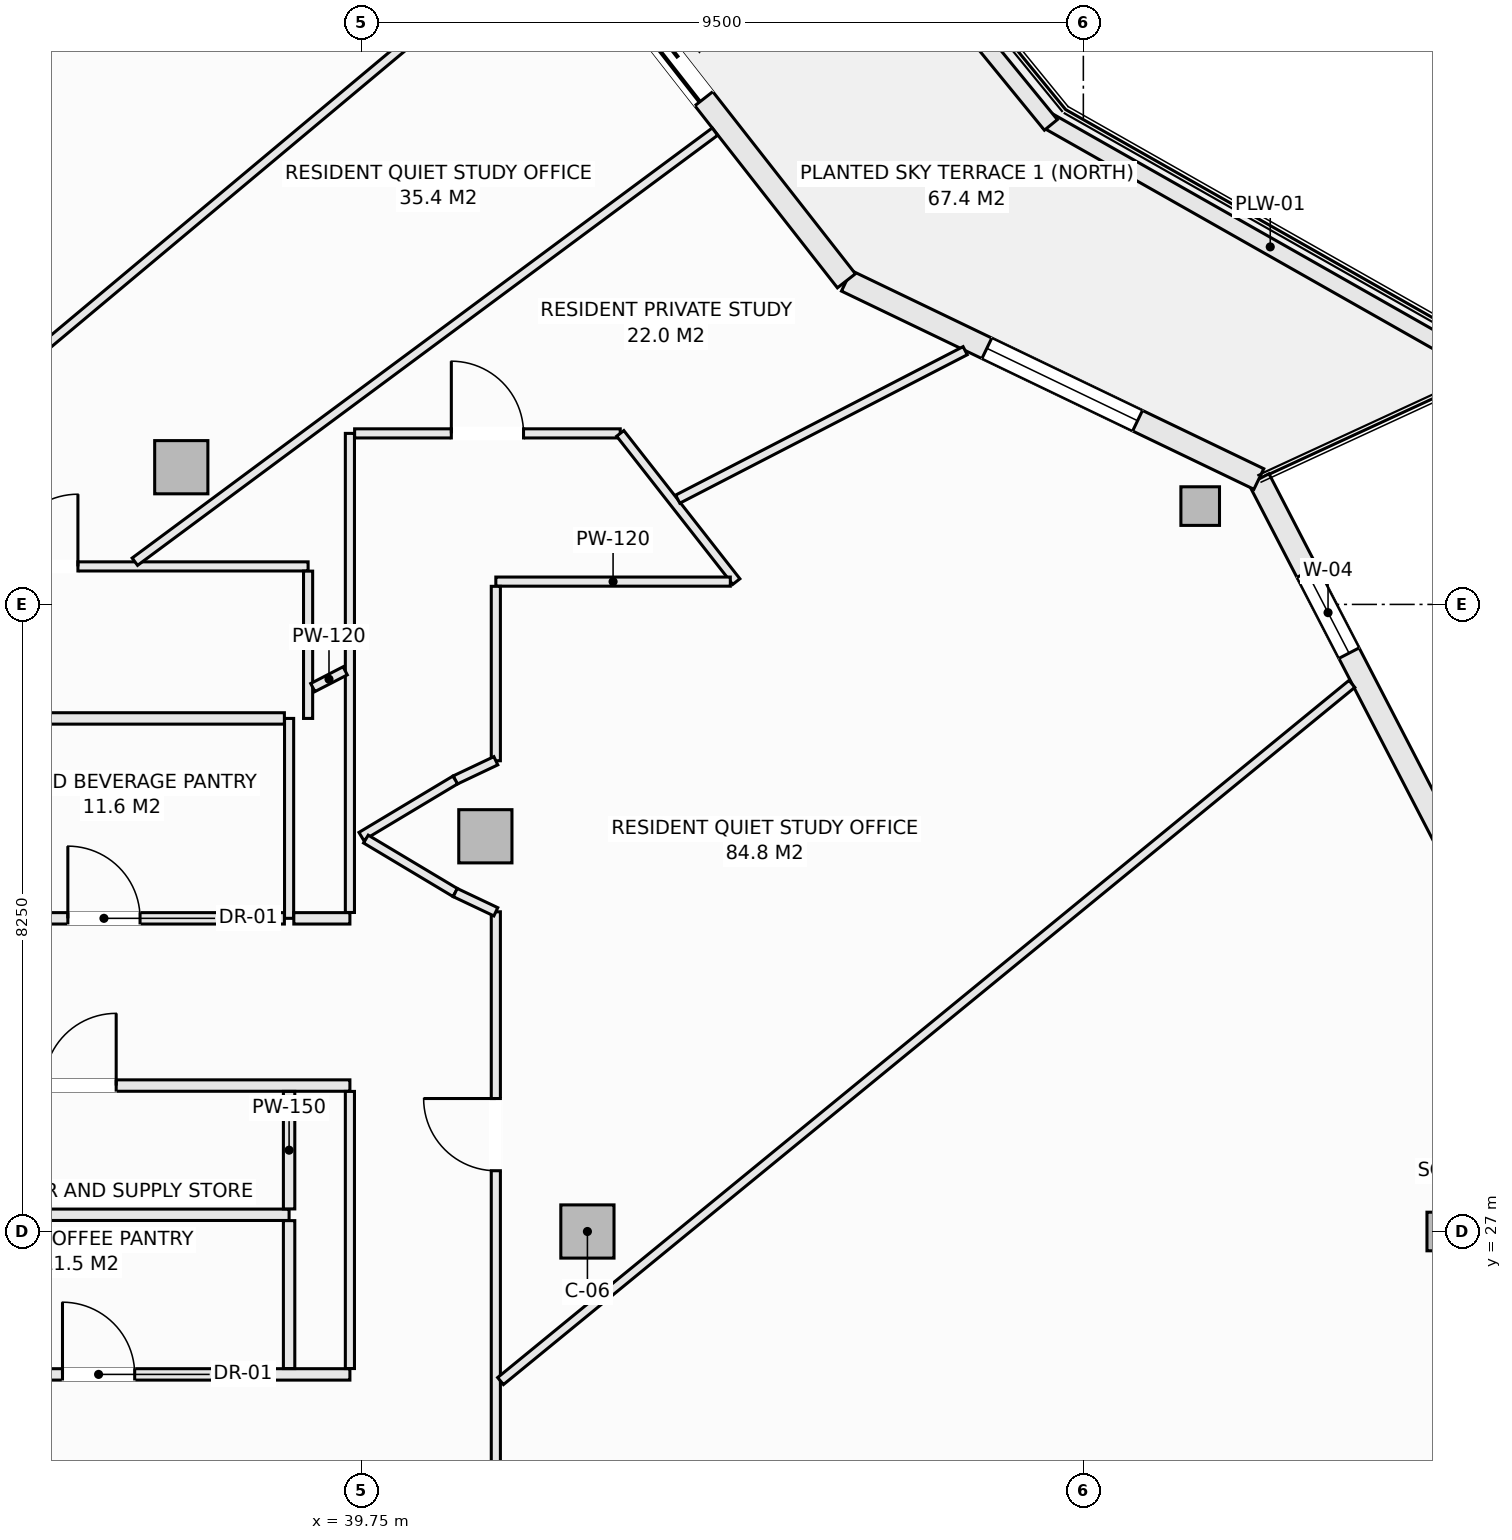
"""IFC4 building model, lengths in metres.
Left out: names, types, materials, properties, quantities, classifications, styles, units other than length and angle.
Written with IfcOpenShell. Run it as: python <this file> out.ifc"""

import sys

from ifc_helpers import new_model, si_unit, direction, frame, frame_2d, origin, origin_2d, place, context, subcontext, project, spatial, rectangle, hollow_rectangle, extrude, element, fill, save


model = new_model("IFC4")
c1 = context("Model", 3, precision=1e-05, world=origin(), true_north=direction((0.0, 1.0)))
c2 = subcontext(c1, "Body", "Model", "MODEL_VIEW")
j1 = project(units=[si_unit("LENGTHUNIT", "METRE"), si_unit("PLANEANGLEUNIT", "RADIAN")], contexts=[c1])
p1 = place(None, origin())
s1 = spatial("IfcSite", under=j1, at=p1, CompositionType="ELEMENT")
p2 = place(p1, origin())
s2 = spatial("IfcBuilding", under=s1, at=p2, CompositionType="ELEMENT")
p3 = place(p2, frame((0.0, 0.0, 216.2)))
s3 = spatial("IfcBuildingStorey", under=s2, at=p3, CompositionType="ELEMENT", Elevation=216.2)
for number, where, z_axis, x_axis in (
    (1, (54.025, 27.0, -0.27), (0.0, 0.0, 1.0), (1.0, 0.0, 0.0)),
    (2, (50.787, 36.544, -0.27), (0.0, 0.0, 1.0), (1.0, 0.0, 0.0)),
):
    element("IfcColumn", number, at=place(p3, frame(where, z_axis=z_axis, x_axis=x_axis)), inside=s3, PredefinedType="COLUMN", context=c2, shape_type="SweptSolid", body=[
        extrude(hollow_rectangle(XDim=0.508, YDim=0.508, WallThickness=0.019, at=origin_2d()), origin(), (0.0, 0.0, 1.0), 3.3),
    ])
for number, where, z_axis, x_axis in (
    (3, (42.725, 27.0, -0.27), (0.0, 0.0, 1.0), (1.0, 0.0, 0.0)),
    (4, (41.382, 32.199, -0.27), (0.0, 0.0, 1.0), (1.0, 0.0, 0.0)),
    (5, (37.382, 37.055, -0.27), (0.0, 0.0, 1.0), (1.0, 0.0, 0.0)),
):
    element("IfcColumn", number, at=place(p3, frame(where, z_axis=z_axis, x_axis=x_axis)), inside=s3, PredefinedType="COLUMN", context=c2, shape_type="SweptSolid", body=[
        extrude(rectangle(XDim=0.7, YDim=0.7, at=origin_2d()), origin(), (0.0, 0.0, 1.0), 3.3),
    ])
p4 = place(p3, frame((51.559, 36.9, 0.0), z_axis=(0.0, 0.0, 1.0), x_axis=(0.459808219482, -0.888018243786, 0.0)))
e6 = element("IfcWall", 6, at=p4, inside=s3, PredefinedType="SOLIDWALL", context=c2, shape_type="SweptSolid", body=[
    extrude(rectangle(XDim=5.378, YDim=0.3, at=frame_2d((2.689, 0.0))), origin(), (0.0, 0.0, 1.0), 2.605),
])
p5 = place(p4, frame((1.38, 0.0, 0.72)))
e7 = element("IfcOpeningElement", 7, at=p5, cuts=e6, PredefinedType="OPENING", context=c2, shape_type="SweptSolid", body=[
    extrude(rectangle(XDim=1.2, YDim=1.65, at=frame_2d((0.6, 0.825))), frame((0.0, 0.16, 0.0), z_axis=(0.0, -1.0, 0.0), x_axis=(1.0, 0.0, 0.0)), (0.0, 0.0, 1.0), 0.32),
])
p6 = place(p3, frame((46.133, 39.507, 0.0), z_axis=(0.0, 0.0, 1.0), x_axis=(0.901348331142, -0.433094892545, 0.0)))
e8 = element("IfcWall", 8, at=p6, inside=s3, PredefinedType="SOLIDWALL", context=c2, shape_type="SweptSolid", body=[
    extrude(rectangle(XDim=6.021, YDim=0.3, at=frame_2d((3.01, 0.0))), origin(), (0.0, 0.0, 1.0), 2.605),
])
p7 = place(p6, frame((2.05, 0.0, 0.72)))
e9 = element("IfcOpeningElement", 9, at=p7, cuts=e8, PredefinedType="OPENING", context=c2, shape_type="SweptSolid", body=[
    extrude(rectangle(XDim=2.2, YDim=1.65, at=frame_2d((1.1, 0.825))), frame((0.0, 0.16, 0.0), z_axis=(0.0, -1.0, 0.0), x_axis=(1.0, 0.0, 0.0)), (0.0, 0.0, 1.0), 0.32),
])
p8 = place(p3, frame((42.5, 44.147, 0.0), z_axis=(0.0, 0.0, 1.0), x_axis=(0.616450126935, -0.787393955401, 0.0)))
e10 = element("IfcWall", 10, at=p8, inside=s3, PredefinedType="SOLIDWALL", context=c2, shape_type="SweptSolid", body=[
    extrude(rectangle(XDim=5.893, YDim=0.3, at=frame_2d((2.946, 0.0))), origin(), (0.0, 0.0, 1.0), 2.605),
])
p9 = place(p8, frame((1.05, 0.0, 0.0)))
e11 = element("IfcOpeningElement", 11, at=p9, cuts=e10, PredefinedType="OPENING", context=c2, shape_type="SweptSolid", body=[
    extrude(rectangle(XDim=1.8, YDim=2.25, at=frame_2d((0.9, 1.125))), frame((0.0, 0.16, 0.0), z_axis=(0.0, -1.0, 0.0), x_axis=(1.0, 0.0, 0.0)), (0.0, 0.0, 1.0), 0.32),
])
p10 = place(p3, frame((48.776, 41.617, 0.0), z_axis=(0.0, 0.0, 1.0), x_axis=(0.869860619267, -0.493297580623, 0.0)))
e12 = element("IfcWall", 12, at=p10, inside=s3, PredefinedType="PARAPET", context=c2, shape_type="SweptSolid", body=[
    extrude(rectangle(XDim=6.743, YDim=0.22, at=frame_2d((3.371, 0.0))), origin(), (0.0, 0.0, 1.0), 0.52),
])
p11 = place(p3, frame((44.448, 46.913, 0.0), z_axis=(0.0, 0.0, 1.0), x_axis=(0.632697312147, -0.774399193699, 0.0)))
e13 = element("IfcWall", 13, at=p11, inside=s3, PredefinedType="PARAPET", context=c2, shape_type="SweptSolid", body=[
    extrude(rectangle(XDim=6.914, YDim=0.22, at=frame_2d((3.457, 0.0))), origin(), (0.0, 0.0, 1.0), 0.52),
])
p12 = place(p3, frame((30.077, 28.92, 0.0), z_axis=(0.0, 0.0, 1.0), x_axis=(1.0, 0.0, 0.0)))
e14 = element("IfcWall", 14, at=p12, inside=s3, PredefinedType="PARTITIONING", context=c2, shape_type="SweptSolid", body=[
    extrude(rectangle(XDim=9.523, YDim=0.15, at=frame_2d((4.762, 0.0))), origin(), (0.0, 0.0, 1.0), 3.03),
])
p13 = place(p12, frame((1.342, 0.0, 0.0)))
e15 = element("IfcOpeningElement", 15, at=p13, cuts=e14, PredefinedType="OPENING", context=c2, shape_type="SweptSolid", body=[
    extrude(rectangle(XDim=0.95, YDim=2.1, at=frame_2d((0.475, 1.05))), frame((0.0, 0.085, 0.0), z_axis=(0.0, -1.0, 0.0), x_axis=(1.0, 0.0, 0.0)), (0.0, 0.0, 1.0), 0.17),
])
p14 = place(p12, frame((5.498, 0.0, 0.0)))
e16 = element("IfcOpeningElement", 16, at=p14, cuts=e14, PredefinedType="OPENING", context=c2, shape_type="SweptSolid", body=[
    extrude(rectangle(XDim=0.95, YDim=2.1, at=frame_2d((0.475, 1.05))), frame((0.0, 0.085, 0.0), z_axis=(0.0, -1.0, 0.0), x_axis=(1.0, 0.0, 0.0)), (0.0, 0.0, 1.0), 0.17),
])
p15 = place(p3, frame((33.377, 25.12, 0.0), z_axis=(0.0, 0.0, 1.0), x_axis=(1.0, 0.0, 0.0)))
e17 = element("IfcWall", 17, at=p15, inside=s3, PredefinedType="PARTITIONING", context=c2, shape_type="SweptSolid", body=[
    extrude(rectangle(XDim=6.223, YDim=0.15, at=frame_2d((3.112, 0.0))), origin(), (0.0, 0.0, 1.0), 3.03),
])
p16 = place(p15, frame((2.441, 0.0, 0.0)))
e18 = element("IfcOpeningElement", 18, at=p16, cuts=e17, PredefinedType="OPENING", context=c2, shape_type="SweptSolid", body=[
    extrude(rectangle(XDim=0.95, YDim=2.1, at=frame_2d((0.475, 1.05))), frame((0.0, 0.085, 0.0), z_axis=(0.0, -1.0, 0.0), x_axis=(1.0, 0.0, 0.0)), (0.0, 0.0, 1.0), 0.17),
])
p17 = place(p3, frame((33.377, 27.22, 0.0), z_axis=(0.0, 0.0, 1.0), x_axis=(1.0, 0.0, 0.0)))
e19 = element("IfcWall", 19, at=p17, inside=s3, PredefinedType="PARTITIONING", context=c2, shape_type="SweptSolid", body=[
    extrude(rectangle(XDim=5.423, YDim=0.15, at=frame_2d((2.711, 0.0))), origin(), (0.0, 0.0, 1.0), 3.03),
])
p18 = place(p3, frame((38.8, 25.197, 0.0), z_axis=(0.0, 0.0, 1.0), x_axis=(0.0, 1.0, 0.0)))
e20 = element("IfcWall", 20, at=p18, inside=s3, PredefinedType="PARTITIONING", context=c2, shape_type="SweptSolid", body=[
    extrude(rectangle(XDim=1.946, YDim=0.15, at=frame_2d((0.973, 0.0))), origin(), (0.0, 0.0, 1.0), 3.03),
])
p19 = place(p3, frame((38.8, 27.297, 0.0), z_axis=(0.0, 0.0, 1.0), x_axis=(0.0, 1.0, 0.0)))
e21 = element("IfcWall", 21, at=p19, inside=s3, PredefinedType="PARTITIONING", context=c2, shape_type="SweptSolid", body=[
    extrude(rectangle(XDim=1.546, YDim=0.15, at=frame_2d((0.773, 0.0))), origin(), (0.0, 0.0, 1.0), 3.03),
])
p20 = place(p3, frame((38.8, 31.12, 0.0), z_axis=(0.0, 0.0, 1.0), x_axis=(0.0, 1.0, 0.0)))
e22 = element("IfcWall", 22, at=p20, inside=s3, PredefinedType="PARTITIONING", context=c2, shape_type="SweptSolid", body=[
    extrude(rectangle(XDim=2.63, YDim=0.12, at=frame_2d((1.315, 0.0))), origin(), (0.0, 0.0, 1.0), 3.03),
])
p21 = place(p3, frame((30.077, 31.12, 0.0), z_axis=(0.0, 0.0, 1.0), x_axis=(1.0, 0.0, 0.0)))
e23 = element("IfcWall", 23, at=p21, inside=s3, PredefinedType="PARTITIONING", context=c2, shape_type="SweptSolid", body=[
    extrude(rectangle(XDim=8.661, YDim=0.15, at=frame_2d((4.331, 0.0))), origin(), (0.0, 0.0, 1.0), 3.03),
])
p22 = place(p21, frame((1.892, 0.0, 0.0)))
e24 = element("IfcOpeningElement", 24, at=p22, cuts=e23, PredefinedType="OPENING", context=c2, shape_type="SweptSolid", body=[
    extrude(rectangle(XDim=0.95, YDim=2.1, at=frame_2d((0.475, 1.05))), frame((0.0, 0.085, 0.0), z_axis=(0.0, -1.0, 0.0), x_axis=(1.0, 0.0, 0.0)), (0.0, 0.0, 1.0), 0.17),
])
p23 = place(p21, frame((5.812, 0.0, 0.0)))
e25 = element("IfcOpeningElement", 25, at=p23, cuts=e23, PredefinedType="OPENING", context=c2, shape_type="SweptSolid", body=[
    extrude(rectangle(XDim=0.95, YDim=2.1, at=frame_2d((0.475, 1.05))), frame((0.0, 0.085, 0.0), z_axis=(0.0, -1.0, 0.0), x_axis=(1.0, 0.0, 0.0)), (0.0, 0.0, 1.0), 0.17),
])
p24 = place(p3, frame((38.862, 31.12, 0.0), z_axis=(0.0, 0.0, 1.0), x_axis=(1.0, 0.0, 0.0)))
e26 = element("IfcWall", 26, at=p24, inside=s3, PredefinedType="PARTITIONING", context=c2, shape_type="SweptSolid", body=[
    extrude(rectangle(XDim=0.738, YDim=0.15, at=frame_2d((0.369, 0.0))), origin(), (0.0, 0.0, 1.0), 3.03),
])
p25 = place(p3, frame((30.077, 33.75, 0.0), z_axis=(0.0, 0.0, 1.0), x_axis=(1.0, 0.0, 0.0)))
e27 = element("IfcWall", 27, at=p25, inside=s3, PredefinedType="PARTITIONING", context=c2, shape_type="SweptSolid", body=[
    extrude(rectangle(XDim=8.661, YDim=0.15, at=frame_2d((4.331, 0.0))), origin(), (0.0, 0.0, 1.0), 3.03),
])
p26 = place(p3, frame((33.833, 35.75, 0.0), z_axis=(0.0, 0.0, 1.0), x_axis=(1.0, 0.0, 0.0)))
e28 = element("IfcWall", 28, at=p26, inside=s3, PredefinedType="PARTITIONING", context=c2, shape_type="SweptSolid", body=[
    extrude(rectangle(XDim=5.217, YDim=0.12, at=frame_2d((2.608, 0.0))), origin(), (0.0, 0.0, 1.0), 2.478),
])
p27 = place(p26, frame((1.239, 0.0, 0.0)))
e29 = element("IfcOpeningElement", 29, at=p27, cuts=e28, PredefinedType="OPENING", context=c2, shape_type="SweptSolid", body=[
    extrude(rectangle(XDim=0.95, YDim=2.1, at=frame_2d((0.475, 1.05))), frame((0.0, 0.07, 0.0), z_axis=(0.0, -1.0, 0.0), x_axis=(1.0, 0.0, 0.0)), (0.0, 0.0, 1.0), 0.14),
])
p28 = place(p3, frame((39.05, 33.75, 0.0), z_axis=(0.0, 0.0, 1.0), x_axis=(0.0, 1.0, 0.0)))
e30 = element("IfcWall", 30, at=p28, inside=s3, PredefinedType="PARTITIONING", context=c2, shape_type="SweptSolid", body=[
    extrude(rectangle(XDim=1.938, YDim=0.12, at=frame_2d((0.969, 0.0))), origin(), (0.0, 0.0, 1.0), 3.03),
])
p29 = place(p3, frame((39.6, 25.197, 0.0), z_axis=(0.0, 0.0, 1.0), x_axis=(0.0, 1.0, 0.0)))
e31 = element("IfcWall", 31, at=p29, inside=s3, PredefinedType="PARTITIONING", context=c2, shape_type="SweptSolid", body=[
    extrude(rectangle(XDim=3.646, YDim=0.12, at=frame_2d((1.823, 0.0))), origin(), (0.0, 0.0, 1.0), 3.03),
])
p30 = place(p3, frame((39.6, 31.197, 0.0), z_axis=(0.0, 0.0, 1.0), x_axis=(0.0, 1.0, 0.0)))
e32 = element("IfcWall", 32, at=p30, inside=s3, PredefinedType="PARTITIONING", context=c2, shape_type="SweptSolid", body=[
    extrude(rectangle(XDim=6.303, YDim=0.12, at=frame_2d((3.151, 0.0))), origin(), (0.0, 0.0, 1.0), 3.03),
])
p31 = place(p3, frame((39.662, 37.5, 0.0), z_axis=(0.0, 0.0, 1.0), x_axis=(1.0, 0.0, 0.0)))
e33 = element("IfcWall", 33, at=p31, inside=s3, PredefinedType="PARTITIONING", context=c2, shape_type="SweptSolid", body=[
    extrude(rectangle(XDim=3.495, YDim=0.12, at=frame_2d((1.748, 0.0))), origin(), (0.0, 0.0, 1.0), 2.77),
])
p32 = place(p31, frame((1.272, 0.0, 0.0)))
e34 = element("IfcOpeningElement", 34, at=p32, cuts=e33, PredefinedType="OPENING", context=c2, shape_type="SweptSolid", body=[
    extrude(rectangle(XDim=0.95, YDim=2.1, at=frame_2d((0.475, 1.05))), frame((0.0, 0.07, 0.0), z_axis=(0.0, -1.0, 0.0), x_axis=(1.0, 0.0, 0.0)), (0.0, 0.0, 1.0), 0.14),
])
p33 = place(p3, frame((43.157, 37.5, 0.0), z_axis=(0.0, 0.0, 1.0), x_axis=(0.616571357052, -0.78729902938, 0.0)))
e35 = element("IfcWall", 35, at=p33, inside=s3, PredefinedType="PARTITIONING", context=c2, shape_type="SweptSolid", body=[
    extrude(rectangle(XDim=2.477, YDim=0.12, at=frame_2d((1.238, 0.0))), origin(), (0.0, 0.0, 1.0), 3.03),
])
p34 = place(p3, frame((41.52, 35.55, 0.0), z_axis=(0.0, 0.0, 1.0), x_axis=(1.0, 0.0, 0.0)))
e36 = element("IfcWall", 36, at=p34, inside=s3, PredefinedType="PARTITIONING", context=c2, shape_type="SweptSolid", body=[
    extrude(rectangle(XDim=3.085, YDim=0.12, at=frame_2d((1.542, 0.0))), origin(), (0.0, 0.0, 1.0), 3.03),
])
p35 = place(p3, frame((41.52, 22.794, 0.0), z_axis=(0.0, 0.0, 1.0), x_axis=(0.0, 1.0, 0.0)))
e37 = element("IfcWall", 37, at=p35, inside=s3, PredefinedType="PARTITIONING", context=c2, shape_type="SweptSolid", body=[
    extrude(rectangle(XDim=8.412, YDim=0.12, at=frame_2d((4.206, 0.0))), origin(), (0.0, 0.0, 1.0), 2.478),
])
p36 = place(p35, frame((5.005, 0.0, 0.0)))
e38 = element("IfcOpeningElement", 38, at=p36, cuts=e37, PredefinedType="OPENING", context=c2, shape_type="SweptSolid", body=[
    extrude(rectangle(XDim=0.95, YDim=2.1, at=frame_2d((0.475, 1.05))), frame((0.0, 0.07, 0.0), z_axis=(0.0, -1.0, 0.0), x_axis=(1.0, 0.0, 0.0)), (0.0, 0.0, 1.0), 0.14),
])
p37 = place(p3, frame((41.52, 33.193, 0.0), z_axis=(0.0, 0.0, 1.0), x_axis=(0.0, 1.0, 0.0)))
e39 = element("IfcWall", 39, at=p37, inside=s3, PredefinedType="PARTITIONING", context=c2, shape_type="SweptSolid", body=[
    extrude(rectangle(XDim=2.295, YDim=0.12, at=frame_2d((1.147, 0.0))), origin(), (0.0, 0.0, 1.0), 3.03),
])
p38 = place(p3, frame((40.986, 32.94, 0.0), z_axis=(0.0, 0.0, 1.0), x_axis=(0.90356951601, 0.428441512621, 0.0)))
e40 = element("IfcWall", 40, at=p38, inside=s3, PredefinedType="PARTITIONING", context=c2, shape_type="SweptSolid", body=[
    extrude(rectangle(XDim=0.591, YDim=0.12, at=frame_2d((0.295, 0.0))), origin(), (0.0, 0.0, 1.0), 3.03),
])
p39 = place(p3, frame((39.75, 32.199, 0.0), z_axis=(0.0, 0.0, 1.0), x_axis=(0.857702120906, 0.514146935996, 0.0)))
e41 = element("IfcWall", 41, at=p39, inside=s3, PredefinedType="PARTITIONING", context=c2, shape_type="SweptSolid", body=[
    extrude(rectangle(XDim=1.441, YDim=0.12, at=frame_2d((0.721, 0.0))), origin(), (0.0, 0.0, 1.0), 3.03),
])
p40 = place(p3, frame((39.81, 32.163, 0.0), z_axis=(0.0, 0.0, 1.0), x_axis=(0.858011245414, -0.513630901273, 0.0)))
e42 = element("IfcWall", 42, at=p40, inside=s3, PredefinedType="PARTITIONING", context=c2, shape_type="SweptSolid", body=[
    extrude(rectangle(XDim=1.37, YDim=0.12, at=frame_2d((0.685, 0.0))), origin(), (0.0, 0.0, 1.0), 3.03),
])
p41 = place(p3, frame((40.986, 31.459, 0.0), z_axis=(0.0, 0.0, 1.0), x_axis=(0.903729424576, -0.428104107847, 0.0)))
e43 = element("IfcWall", 43, at=p41, inside=s3, PredefinedType="PARTITIONING", context=c2, shape_type="SweptSolid", body=[
    extrude(rectangle(XDim=0.591, YDim=0.12, at=frame_2d((0.295, 0.0))), origin(), (0.0, 0.0, 1.0), 3.03),
])
p42 = place(p3, frame((39.112, 34.156, 0.0), z_axis=(0.0, 0.0, 1.0), x_axis=(0.888547006739, 0.458785589153, 0.0)))
e44 = element("IfcWall", 44, at=p42, inside=s3, PredefinedType="PARTITIONING", context=c2, shape_type="SweptSolid", body=[
    extrude(rectangle(XDim=0.479, YDim=0.12, at=frame_2d((0.24, 0.0))), origin(), (0.0, 0.0, 1.0), 3.03),
])
p43 = place(p3, frame((43.913, 36.635, 0.0), z_axis=(0.0, 0.0, 1.0), x_axis=(0.888547502497, 0.458784629, 0.0)))
e45 = element("IfcWall", 45, at=p43, inside=s3, PredefinedType="PARTITIONING", context=c2, shape_type="SweptSolid", body=[
    extrude(rectangle(XDim=4.257, YDim=0.12, at=frame_2d((2.128, 0.0))), origin(), (0.0, 0.0, 1.0), 3.03),
])
p44 = place(p3, frame((41.582, 25.032, 0.0), z_axis=(0.0, 0.0, 1.0), x_axis=(0.773716066315, 0.633532515919, 0.0)))
e46 = element("IfcWall", 46, at=p44, inside=s3, PredefinedType="PARTITIONING", context=c2, shape_type="SweptSolid", body=[
    extrude(rectangle(XDim=14.478, YDim=0.12, at=frame_2d((7.239, 0.0))), origin(), (0.0, 0.0, 1.0), 2.478),
])
p45 = place(p3, frame((36.771, 35.812, 0.0), z_axis=(0.0, 0.0, 1.0), x_axis=(0.803336358715, 0.595525561807, 0.0)))
e47 = element("IfcWall", 47, at=p45, inside=s3, PredefinedType="PARTITIONING", context=c2, shape_type="SweptSolid", body=[
    extrude(rectangle(XDim=9.501, YDim=0.12, at=frame_2d((4.75, 0.0))), origin(), (0.0, 0.0, 1.0), 3.03),
])
p46 = place(p3, frame((33.348, 36.772, 0.0), z_axis=(0.0, 0.0, 1.0), x_axis=(0.766923298506, 0.641738774119, 0.0)))
e48 = element("IfcWall", 48, at=p46, inside=s3, PredefinedType="PARTITIONING", context=c2, shape_type="SweptSolid", body=[
    extrude(rectangle(XDim=11.438, YDim=0.12, at=frame_2d((5.719, 0.0))), origin(), (0.0, 0.0, 1.0), 3.03),
])
p47 = place(p5, origin())
e49 = element("IfcWindow", 49, at=p47, inside=s3, PartitioningType="SINGLE_PANEL", PredefinedType="WINDOW", context=c2, shape_type="SweptSolid", body=[
    extrude(rectangle(XDim=1.2, YDim=1.65, at=frame_2d((0.6, 0.825))), frame((0.0, 0.03, 0.0), z_axis=(0.0, -1.0, 0.0), x_axis=(1.0, 0.0, 0.0)), (0.0, 0.0, 1.0), 0.06),
])
fill(e7, e49)
p48 = place(p7, origin())
e50 = element("IfcWindow", 50, at=p48, inside=s3, PartitioningType="SINGLE_PANEL", PredefinedType="WINDOW", context=c2, shape_type="SweptSolid", body=[
    extrude(rectangle(XDim=2.2, YDim=1.65, at=frame_2d((1.1, 0.825))), frame((0.0, 0.03, 0.0), z_axis=(0.0, -1.0, 0.0), x_axis=(1.0, 0.0, 0.0)), (0.0, 0.0, 1.0), 0.06),
])
fill(e9, e50)
p49 = place(p9, origin())
e51 = element("IfcDoor", 51, at=p49, inside=s3, OperationType="SLIDING_TO_LEFT", PredefinedType="DOOR", context=c2, shape_type="SweptSolid", body=[
    extrude(rectangle(XDim=1.8, YDim=2.25, at=frame_2d((0.9, 1.125))), frame((0.0, 0.025, 0.0), z_axis=(0.0, -1.0, 0.0), x_axis=(1.0, 0.0, 0.0)), (0.0, 0.0, 1.0), 0.05),
])
fill(e11, e51)
p50 = place(p14, origin())
e52 = element("IfcDoor", 52, at=p50, inside=s3, OperationType="SINGLE_SWING_RIGHT", PredefinedType="DOOR", context=c2, shape_type="SweptSolid", body=[
    extrude(rectangle(XDim=0.95, YDim=2.1, at=frame_2d((0.475, 1.05))), frame((0.0, 0.025, 0.0), z_axis=(0.0, -1.0, 0.0), x_axis=(1.0, 0.0, 0.0)), (0.0, 0.0, 1.0), 0.05),
])
fill(e16, e52)
p51 = place(p16, origin())
e53 = element("IfcDoor", 53, at=p51, inside=s3, OperationType="SINGLE_SWING_LEFT", PredefinedType="DOOR", context=c2, shape_type="SweptSolid", body=[
    extrude(rectangle(XDim=0.95, YDim=2.1, at=frame_2d((0.475, 1.05))), frame((0.0, 0.025, 0.0), z_axis=(0.0, -1.0, 0.0), x_axis=(1.0, 0.0, 0.0)), (0.0, 0.0, 1.0), 0.05),
])
fill(e18, e53)
p52 = place(p23, origin())
e54 = element("IfcDoor", 54, at=p52, inside=s3, OperationType="SINGLE_SWING_LEFT", PredefinedType="DOOR", context=c2, shape_type="SweptSolid", body=[
    extrude(rectangle(XDim=0.95, YDim=2.1, at=frame_2d((0.475, 1.05))), frame((0.0, 0.025, 0.0), z_axis=(0.0, -1.0, 0.0), x_axis=(1.0, 0.0, 0.0)), (0.0, 0.0, 1.0), 0.05),
])
fill(e25, e54)
p53 = place(p36, origin())
e55 = element("IfcDoor", 55, at=p53, inside=s3, OperationType="SINGLE_SWING_RIGHT", PredefinedType="DOOR", context=c2, shape_type="SweptSolid", body=[
    extrude(rectangle(XDim=0.95, YDim=2.1, at=frame_2d((0.475, 1.05))), frame((0.0, 0.025, 0.0), z_axis=(0.0, -1.0, 0.0), x_axis=(1.0, 0.0, 0.0)), (0.0, 0.0, 1.0), 0.05),
])
fill(e38, e55)
p54 = place(p32, origin())
e56 = element("IfcDoor", 56, at=p54, inside=s3, OperationType="SINGLE_SWING_LEFT", PredefinedType="DOOR", context=c2, shape_type="SweptSolid", body=[
    extrude(rectangle(XDim=0.95, YDim=2.1, at=frame_2d((0.475, 1.05))), frame((0.0, 0.025, 0.0), z_axis=(0.0, -1.0, 0.0), x_axis=(1.0, 0.0, 0.0)), (0.0, 0.0, 1.0), 0.05),
])
fill(e34, e56)
p55 = place(p27, origin())
e57 = element("IfcDoor", 57, at=p55, inside=s3, OperationType="SINGLE_SWING_RIGHT", PredefinedType="DOOR", context=c2, shape_type="SweptSolid", body=[
    extrude(rectangle(XDim=0.95, YDim=2.1, at=frame_2d((0.475, 1.05))), frame((0.0, 0.025, 0.0), z_axis=(0.0, -1.0, 0.0), x_axis=(1.0, 0.0, 0.0)), (0.0, 0.0, 1.0), 0.05),
])
fill(e29, e57)
save(model, sys.argv[1])
